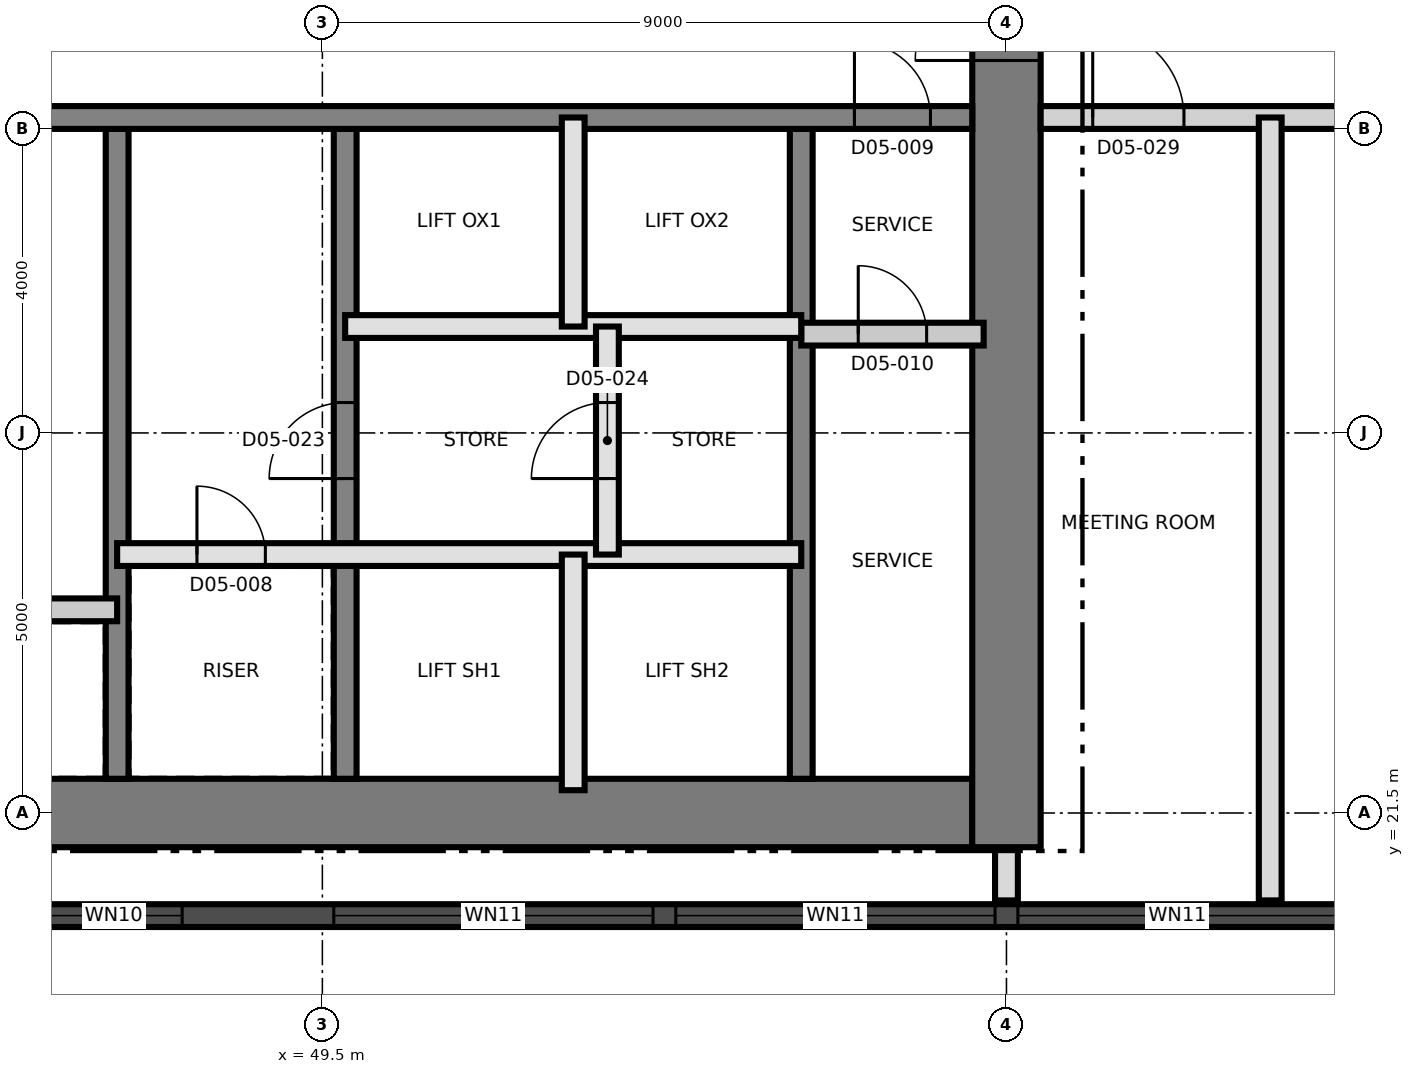
"""IFC4 building model, lengths in metres.
Left out: names, types, materials, properties, quantities, classifications, styles, units other than length and angle.
Written with IfcOpenShell. Run it as: python <this file> out.ifc"""

import sys

from ifc_helpers import new_model, si_unit, direction, frame, frame_2d, origin, place, context, subcontext, project, spatial, rectangle, extrude, element, fill, save


model = new_model("IFC4")
c1 = context("Model", 3, precision=1e-05, world=origin(), true_north=direction((0.0, 1.0)))
c2 = subcontext(c1, "Body", "Model", "MODEL_VIEW")
j1 = project(units=[si_unit("LENGTHUNIT", "METRE"), si_unit("PLANEANGLEUNIT", "RADIAN")], contexts=[c1])
p1 = place(None, origin())
s1 = spatial("IfcSite", under=j1, at=p1, CompositionType="ELEMENT")
p2 = place(p1, origin())
s2 = spatial("IfcBuilding", under=s1, at=p2, CompositionType="ELEMENT")
p3 = place(p2, frame((0.0, 0.0, 77.9)))
s3 = spatial("IfcBuildingStorey", under=s2, at=p3, CompositionType="ELEMENT", Elevation=77.9)
p4 = place(p3, frame((31.05, 21.5, 0.0), z_axis=(0.0, 0.0, 1.0), x_axis=(1.0, 0.0, 0.0)))
e1 = element("IfcWall", 1, at=p4, inside=s3, PredefinedType="SHEAR", context=c2, shape_type="SweptSolid", body=[
    extrude(rectangle(XDim=27.0, YDim=0.9, at=frame_2d((13.5, 0.0))), origin(), (0.0, 0.0, 1.0), 3.7),
])
p5 = place(p3, frame((58.5, 21.05, 0.0), z_axis=(0.0, 0.0, 1.0), x_axis=(0.0, 1.0, 0.0)))
e2 = element("IfcWall", 2, at=p5, inside=s3, PredefinedType="SHEAR", context=c2, shape_type="SweptSolid", body=[
    extrude(rectangle(XDim=18.9, YDim=0.9, at=frame_2d((9.45, 0.0))), origin(), (0.0, 0.0, 1.0), 3.7),
])
p6 = place(p5, frame((10.35, 0.0, 0.0)))
e3 = element("IfcOpeningElement", 3, at=p6, cuts=e2, PredefinedType="OPENING", context=c2, shape_type="SweptSolid", body=[
    extrude(rectangle(XDim=1.2, YDim=2.1, at=frame_2d((0.6, 1.05))), frame((0.0, 0.46, 0.0), z_axis=(0.0, -1.0, 0.0), x_axis=(1.0, 0.0, 0.0)), (0.0, 0.0, 1.0), 0.92),
])
p7 = place(p3, frame((46.8, 21.95, 0.0), z_axis=(0.0, 0.0, 1.0), x_axis=(0.0, 1.0, 0.0)))
e4 = element("IfcWall", 4, at=p7, inside=s3, PredefinedType="SHEAR", context=c2, shape_type="SweptSolid", body=[
    extrude(rectangle(XDim=8.55, YDim=0.3, at=frame_2d((4.275, 0.0))), origin(), (0.0, 0.0, 1.0), 3.7),
])
p8 = place(p3, frame((49.8, 21.95, 0.0), z_axis=(0.0, 0.0, 1.0), x_axis=(0.0, 1.0, 0.0)))
e5 = element("IfcWall", 5, at=p8, inside=s3, PredefinedType="SHEAR", context=c2, shape_type="SweptSolid", body=[
    extrude(rectangle(XDim=8.55, YDim=0.3, at=frame_2d((4.275, 0.0))), origin(), (0.0, 0.0, 1.0), 3.7),
])
p9 = place(p8, frame((3.95, 0.0, 0.0)))
e6 = element("IfcOpeningElement", 6, at=p9, cuts=e5, PredefinedType="OPENING", context=c2, shape_type="SweptSolid", body=[
    extrude(rectangle(XDim=1.0, YDim=2.1, at=frame_2d((0.5, 1.05))), frame((0.0, 0.16, 0.0), z_axis=(0.0, -1.0, 0.0), x_axis=(1.0, 0.0, 0.0)), (0.0, 0.0, 1.0), 0.32),
])
p10 = place(p3, frame((55.8, 21.95, 0.0), z_axis=(0.0, 0.0, 1.0), x_axis=(0.0, 1.0, 0.0)))
e7 = element("IfcWall", 7, at=p10, inside=s3, PredefinedType="SHEAR", context=c2, shape_type="SweptSolid", body=[
    extrude(rectangle(XDim=8.55, YDim=0.3, at=frame_2d((4.275, 0.0))), origin(), (0.0, 0.0, 1.0), 3.7),
])
p11 = place(p3, frame((31.95, 30.65, 0.0), z_axis=(0.0, 0.0, 1.0), x_axis=(1.0, 0.0, 0.0)))
e8 = element("IfcWall", 8, at=p11, inside=s3, PredefinedType="SHEAR", context=c2, shape_type="SweptSolid", body=[
    extrude(rectangle(XDim=26.1, YDim=0.3, at=frame_2d((13.05, 0.0))), origin(), (0.0, 0.0, 1.0), 3.7),
])
p12 = place(p11, frame((24.55, 0.0, 0.0)))
e9 = element("IfcOpeningElement", 9, at=p12, cuts=e8, PredefinedType="OPENING", context=c2, shape_type="SweptSolid", body=[
    extrude(rectangle(XDim=1.0, YDim=2.1, at=frame_2d((0.5, 1.05))), frame((0.0, 0.16, 0.0), z_axis=(0.0, -1.0, 0.0), x_axis=(1.0, 0.0, 0.0)), (0.0, 0.0, 1.0), 0.32),
])
p13 = place(p11, frame((11.35, 0.0, 0.0)))
e10 = element("IfcOpeningElement", 10, at=p13, cuts=e8, PredefinedType="OPENING", context=c2, shape_type="SweptSolid", body=[
    extrude(rectangle(XDim=1.0, YDim=2.1, at=frame_2d((0.5, 1.05))), frame((0.0, 0.16, 0.0), z_axis=(0.0, -1.0, 0.0), x_axis=(1.0, 0.0, 0.0)), (0.0, 0.0, 1.0), 0.32),
])
p14 = place(p3, frame((44.011, 20.15, 0.0), z_axis=(0.0, 0.0, 1.0), x_axis=(1.0, 0.0, 0.0)))
e11 = element("IfcWall", 11, at=p14, inside=s3, PredefinedType="SOLIDWALL", context=c2, shape_type="SweptSolid", body=[
    extrude(rectangle(XDim=43.476, YDim=0.3, at=frame_2d((21.738, 0.0))), origin(), (0.0, 0.0, 1.0), 3.4),
])
p15 = place(p14, frame((1.845, 0.0, 0.3)))
e12 = element("IfcOpeningElement", 12, at=p15, cuts=e11, PredefinedType="OPENING", context=c2, shape_type="SweptSolid", body=[
    extrude(rectangle(XDim=1.8, YDim=2.4, at=frame_2d((0.9, 1.2))), frame((0.0, 0.16, 0.0), z_axis=(0.0, -1.0, 0.0), x_axis=(1.0, 0.0, 0.0)), (0.0, 0.0, 1.0), 0.32),
])
p16 = place(p14, frame((5.639, 0.0, 0.9)))
e13 = element("IfcOpeningElement", 13, at=p16, cuts=e11, PredefinedType="OPENING", context=c2, shape_type="SweptSolid", body=[
    extrude(rectangle(XDim=4.2, YDim=1.5, at=frame_2d((2.1, 0.75))), frame((0.0, 0.16, 0.0), z_axis=(0.0, -1.0, 0.0), x_axis=(1.0, 0.0, 0.0)), (0.0, 0.0, 1.0), 0.32),
])
p17 = place(p14, frame((10.139, 0.0, 0.9)))
e14 = element("IfcOpeningElement", 14, at=p17, cuts=e11, PredefinedType="OPENING", context=c2, shape_type="SweptSolid", body=[
    extrude(rectangle(XDim=4.2, YDim=1.5, at=frame_2d((2.1, 0.75))), frame((0.0, 0.16, 0.0), z_axis=(0.0, -1.0, 0.0), x_axis=(1.0, 0.0, 0.0)), (0.0, 0.0, 1.0), 0.32),
])
p18 = place(p14, frame((14.639, 0.0, 0.9)))
e15 = element("IfcOpeningElement", 15, at=p18, cuts=e11, PredefinedType="OPENING", context=c2, shape_type="SweptSolid", body=[
    extrude(rectangle(XDim=4.2, YDim=1.5, at=frame_2d((2.1, 0.75))), frame((0.0, 0.16, 0.0), z_axis=(0.0, -1.0, 0.0), x_axis=(1.0, 0.0, 0.0)), (0.0, 0.0, 1.0), 0.32),
])
p19 = place(p14, frame((19.139, 0.0, 0.9)))
e16 = element("IfcOpeningElement", 16, at=p19, cuts=e11, PredefinedType="OPENING", context=c2, shape_type="SweptSolid", body=[
    extrude(rectangle(XDim=4.2, YDim=1.5, at=frame_2d((2.1, 0.75))), frame((0.0, 0.16, 0.0), z_axis=(0.0, -1.0, 0.0), x_axis=(1.0, 0.0, 0.0)), (0.0, 0.0, 1.0), 0.32),
])
p20 = place(p14, frame((23.639, 0.0, 0.9)))
e17 = element("IfcOpeningElement", 17, at=p20, cuts=e11, PredefinedType="OPENING", context=c2, shape_type="SweptSolid", body=[
    extrude(rectangle(XDim=4.2, YDim=1.5, at=frame_2d((2.1, 0.75))), frame((0.0, 0.16, 0.0), z_axis=(0.0, -1.0, 0.0), x_axis=(1.0, 0.0, 0.0)), (0.0, 0.0, 1.0), 0.32),
])
p21 = place(p14, frame((28.139, 0.0, 0.9)))
e18 = element("IfcOpeningElement", 18, at=p21, cuts=e11, PredefinedType="OPENING", context=c2, shape_type="SweptSolid", body=[
    extrude(rectangle(XDim=4.2, YDim=1.5, at=frame_2d((2.1, 0.75))), frame((0.0, 0.16, 0.0), z_axis=(0.0, -1.0, 0.0), x_axis=(1.0, 0.0, 0.0)), (0.0, 0.0, 1.0), 0.32),
])
p22 = place(p14, frame((32.639, 0.0, 0.9)))
e19 = element("IfcOpeningElement", 19, at=p22, cuts=e11, PredefinedType="OPENING", context=c2, shape_type="SweptSolid", body=[
    extrude(rectangle(XDim=4.2, YDim=1.5, at=frame_2d((2.1, 0.75))), frame((0.0, 0.16, 0.0), z_axis=(0.0, -1.0, 0.0), x_axis=(1.0, 0.0, 0.0)), (0.0, 0.0, 1.0), 0.32),
])
p23 = place(p14, frame((37.139, 0.0, 0.9)))
e20 = element("IfcOpeningElement", 20, at=p23, cuts=e11, PredefinedType="OPENING", context=c2, shape_type="SweptSolid", body=[
    extrude(rectangle(XDim=4.2, YDim=1.5, at=frame_2d((2.1, 0.75))), frame((0.0, 0.16, 0.0), z_axis=(0.0, -1.0, 0.0), x_axis=(1.0, 0.0, 0.0)), (0.0, 0.0, 1.0), 0.32),
])
p24 = place(p3, frame((40.8, 24.173, 0.0), z_axis=(0.0, 0.0, 1.0), x_axis=(1.0, 0.0, 0.0)))
e21 = element("IfcWall", 21, at=p24, inside=s3, PredefinedType="PARTITIONING", context=c2, shape_type="SweptSolid", body=[
    extrude(rectangle(XDim=6.0, YDim=0.3, at=frame_2d((3.0, 0.0))), origin(), (0.0, 0.0, 1.0), 3.4),
])
p25 = place(p24, frame((2.5, 0.0, 0.0)))
e22 = element("IfcOpeningElement", 22, at=p25, cuts=e21, PredefinedType="OPENING", context=c2, shape_type="SweptSolid", body=[
    extrude(rectangle(XDim=1.0, YDim=2.1, at=frame_2d((0.5, 1.05))), frame((0.0, 0.16, 0.0), z_axis=(0.0, -1.0, 0.0), x_axis=(1.0, 0.0, 0.0)), (0.0, 0.0, 1.0), 0.32),
])
p26 = place(p3, frame((46.8, 24.9, 0.0), z_axis=(0.0, 0.0, 1.0), x_axis=(1.0, 0.0, 0.0)))
e23 = element("IfcWall", 23, at=p26, inside=s3, PredefinedType="SOLIDWALL", context=c2, shape_type="SweptSolid", body=[
    extrude(rectangle(XDim=9.0, YDim=0.3, at=frame_2d((4.5, 0.0))), origin(), (0.0, 0.0, 1.0), 3.4),
])
p27 = place(p26, frame((1.05, 0.0, 0.0)))
e24 = element("IfcOpeningElement", 24, at=p27, cuts=e23, PredefinedType="OPENING", context=c2, shape_type="SweptSolid", body=[
    extrude(rectangle(XDim=0.9, YDim=2.1, at=frame_2d((0.45, 1.05))), frame((0.0, 0.16, 0.0), z_axis=(0.0, -1.0, 0.0), x_axis=(1.0, 0.0, 0.0)), (0.0, 0.0, 1.0), 0.32),
])
p28 = place(p3, frame((55.8, 27.8, 0.0), z_axis=(0.0, 0.0, 1.0), x_axis=(1.0, 0.0, 0.0)))
e25 = element("IfcWall", 25, at=p28, inside=s3, PredefinedType="PARTITIONING", context=c2, shape_type="SweptSolid", body=[
    extrude(rectangle(XDim=2.4, YDim=0.3, at=frame_2d((1.2, 0.0))), origin(), (0.0, 0.0, 1.0), 3.4),
])
p29 = place(p28, frame((0.75, 0.0, 0.0)))
e26 = element("IfcOpeningElement", 26, at=p29, cuts=e25, PredefinedType="OPENING", context=c2, shape_type="SweptSolid", body=[
    extrude(rectangle(XDim=0.9, YDim=2.1, at=frame_2d((0.45, 1.05))), frame((0.0, 0.16, 0.0), z_axis=(0.0, -1.0, 0.0), x_axis=(1.0, 0.0, 0.0)), (0.0, 0.0, 1.0), 0.32),
])
p30 = place(p3, frame((49.8, 27.9, 0.0), z_axis=(0.0, 0.0, 1.0), x_axis=(1.0, 0.0, 0.0)))
e27 = element("IfcWall", 27, at=p30, inside=s3, PredefinedType="SOLIDWALL", context=c2, shape_type="SweptSolid", body=[
    extrude(rectangle(XDim=6.0, YDim=0.3, at=frame_2d((3.0, 0.0))), origin(), (0.0, 0.0, 1.0), 3.4),
])
p31 = place(p3, frame((52.8, 21.8, 0.0), z_axis=(0.0, 0.0, 1.0), x_axis=(0.0, 1.0, 0.0)))
e28 = element("IfcWall", 28, at=p31, inside=s3, PredefinedType="SOLIDWALL", context=c2, shape_type="SweptSolid", body=[
    extrude(rectangle(XDim=3.1, YDim=0.3, at=frame_2d((1.55, 0.0))), origin(), (0.0, 0.0, 1.0), 3.4),
])
p32 = place(p3, frame((52.8, 27.9, 0.0), z_axis=(0.0, 0.0, 1.0), x_axis=(0.0, 1.0, 0.0)))
e29 = element("IfcWall", 29, at=p32, inside=s3, PredefinedType="SOLIDWALL", context=c2, shape_type="SweptSolid", body=[
    extrude(rectangle(XDim=2.75, YDim=0.3, at=frame_2d((1.375, 0.0))), origin(), (0.0, 0.0, 1.0), 3.4),
])
p33 = place(p3, frame((53.25, 24.9, 0.0), z_axis=(0.0, 0.0, 1.0), x_axis=(0.0, 1.0, 0.0)))
e30 = element("IfcWall", 30, at=p33, inside=s3, PredefinedType="SOLIDWALL", context=c2, shape_type="SweptSolid", body=[
    extrude(rectangle(XDim=3.0, YDim=0.3, at=frame_2d((1.5, 0.0))), origin(), (0.0, 0.0, 1.0), 3.4),
])
p34 = place(p33, frame((1.0, 0.0, 0.0)))
e31 = element("IfcOpeningElement", 31, at=p34, cuts=e30, PredefinedType="OPENING", context=c2, shape_type="SweptSolid", body=[
    extrude(rectangle(XDim=1.0, YDim=2.1, at=frame_2d((0.5, 1.05))), frame((0.0, 0.16, 0.0), z_axis=(0.0, -1.0, 0.0), x_axis=(1.0, 0.0, 0.0)), (0.0, 0.0, 1.0), 0.32),
])
p35 = place(p3, frame((58.95, 30.65, 0.0), z_axis=(0.0, 0.0, 1.0), x_axis=(1.0, 0.0, 0.0)))
e32 = element("IfcWall", 32, at=p35, inside=s3, PredefinedType="PARTITIONING", context=c2, shape_type="SweptSolid", body=[
    extrude(rectangle(XDim=26.38, YDim=0.3, at=frame_2d((13.19, 0.0))), origin(), (0.0, 0.0, 1.0), 3.4),
])
p36 = place(p35, frame((0.685, 0.0, 0.0)))
e33 = element("IfcOpeningElement", 33, at=p36, cuts=e32, PredefinedType="OPENING", context=c2, shape_type="SweptSolid", body=[
    extrude(rectangle(XDim=1.2, YDim=2.1, at=frame_2d((0.6, 1.05))), frame((0.0, 0.16, 0.0), z_axis=(0.0, -1.0, 0.0), x_axis=(1.0, 0.0, 0.0)), (0.0, 0.0, 1.0), 0.32),
])
p37 = place(p35, frame((3.935, 0.0, 0.0)))
e34 = element("IfcOpeningElement", 34, at=p37, cuts=e32, PredefinedType="OPENING", context=c2, shape_type="SweptSolid", body=[
    extrude(rectangle(XDim=1.0, YDim=2.1, at=frame_2d((0.5, 1.05))), frame((0.0, 0.16, 0.0), z_axis=(0.0, -1.0, 0.0), x_axis=(1.0, 0.0, 0.0)), (0.0, 0.0, 1.0), 0.32),
])
p38 = place(p35, frame((11.965, 0.0, 0.0)))
e35 = element("IfcOpeningElement", 35, at=p38, cuts=e32, PredefinedType="OPENING", context=c2, shape_type="SweptSolid", body=[
    extrude(rectangle(XDim=1.0, YDim=2.1, at=frame_2d((0.5, 1.05))), frame((0.0, 0.16, 0.0), z_axis=(0.0, -1.0, 0.0), x_axis=(1.0, 0.0, 0.0)), (0.0, 0.0, 1.0), 0.32),
])
p39 = place(p35, frame((14.915, 0.0, 0.0)))
e36 = element("IfcOpeningElement", 36, at=p39, cuts=e32, PredefinedType="OPENING", context=c2, shape_type="SweptSolid", body=[
    extrude(rectangle(XDim=1.4, YDim=2.1, at=frame_2d((0.7, 1.05))), frame((0.0, 0.16, 0.0), z_axis=(0.0, -1.0, 0.0), x_axis=(1.0, 0.0, 0.0)), (0.0, 0.0, 1.0), 0.32),
])
p40 = place(p35, frame((18.685, 0.0, 0.0)))
e37 = element("IfcOpeningElement", 37, at=p40, cuts=e32, PredefinedType="OPENING", context=c2, shape_type="SweptSolid", body=[
    extrude(rectangle(XDim=1.2, YDim=2.1, at=frame_2d((0.6, 1.05))), frame((0.0, 0.16, 0.0), z_axis=(0.0, -1.0, 0.0), x_axis=(1.0, 0.0, 0.0)), (0.0, 0.0, 1.0), 0.32),
])
p41 = place(p35, frame((21.935, 0.0, 0.0)))
e38 = element("IfcOpeningElement", 38, at=p41, cuts=e32, PredefinedType="OPENING", context=c2, shape_type="SweptSolid", body=[
    extrude(rectangle(XDim=1.0, YDim=2.1, at=frame_2d((0.5, 1.05))), frame((0.0, 0.16, 0.0), z_axis=(0.0, -1.0, 0.0), x_axis=(1.0, 0.0, 0.0)), (0.0, 0.0, 1.0), 0.32),
])
p42 = place(p3, frame((58.5, 20.35, 0.0), z_axis=(0.0, 0.0, 1.0), x_axis=(0.0, 1.0, 0.0)))
e39 = element("IfcWall", 39, at=p42, inside=s3, PredefinedType="PARTITIONING", context=c2, shape_type="SweptSolid", body=[
    extrude(rectangle(XDim=0.68, YDim=0.3, at=frame_2d((0.34, 0.0))), origin(), (0.0, 0.0, 1.0), 3.4),
])
p43 = place(p3, frame((61.97, 20.35, 0.0), z_axis=(0.0, 0.0, 1.0), x_axis=(0.0, 1.0, 0.0)))
e40 = element("IfcWall", 40, at=p43, inside=s3, PredefinedType="PARTITIONING", context=c2, shape_type="SweptSolid", body=[
    extrude(rectangle(XDim=10.3, YDim=0.3, at=frame_2d((5.15, 0.0))), origin(), (0.0, 0.0, 1.0), 3.4),
])
p44 = place(p15, origin())
e41 = element("IfcWindow", 41, at=p44, inside=s3, PartitioningType="SINGLE_PANEL", PredefinedType="WINDOW", context=c2, shape_type="SweptSolid", body=[
    extrude(rectangle(XDim=1.8, YDim=2.4, at=frame_2d((0.9, 1.2))), frame((0.0, 0.03, 0.0), z_axis=(0.0, -1.0, 0.0), x_axis=(1.0, 0.0, 0.0)), (0.0, 0.0, 1.0), 0.06),
])
fill(e12, e41)
p45 = place(p16, origin())
e42 = element("IfcWindow", 42, at=p45, inside=s3, PartitioningType="SINGLE_PANEL", PredefinedType="WINDOW", context=c2, shape_type="SweptSolid", body=[
    extrude(rectangle(XDim=4.2, YDim=1.5, at=frame_2d((2.1, 0.75))), frame((0.0, 0.03, 0.0), z_axis=(0.0, -1.0, 0.0), x_axis=(1.0, 0.0, 0.0)), (0.0, 0.0, 1.0), 0.06),
])
fill(e13, e42)
p46 = place(p17, origin())
e43 = element("IfcWindow", 43, at=p46, inside=s3, PartitioningType="SINGLE_PANEL", PredefinedType="WINDOW", context=c2, shape_type="SweptSolid", body=[
    extrude(rectangle(XDim=4.2, YDim=1.5, at=frame_2d((2.1, 0.75))), frame((0.0, 0.03, 0.0), z_axis=(0.0, -1.0, 0.0), x_axis=(1.0, 0.0, 0.0)), (0.0, 0.0, 1.0), 0.06),
])
fill(e14, e43)
p47 = place(p18, origin())
e44 = element("IfcWindow", 44, at=p47, inside=s3, PartitioningType="SINGLE_PANEL", PredefinedType="WINDOW", context=c2, shape_type="SweptSolid", body=[
    extrude(rectangle(XDim=4.2, YDim=1.5, at=frame_2d((2.1, 0.75))), frame((0.0, 0.03, 0.0), z_axis=(0.0, -1.0, 0.0), x_axis=(1.0, 0.0, 0.0)), (0.0, 0.0, 1.0), 0.06),
])
fill(e15, e44)
p48 = place(p27, origin())
e45 = element("IfcDoor", 45, at=p48, inside=s3, OperationType="SINGLE_SWING_RIGHT", PredefinedType="DOOR", context=c2, shape_type="SweptSolid", body=[
    extrude(rectangle(XDim=0.9, YDim=2.1, at=frame_2d((0.45, 1.05))), frame((0.0, 0.025, 0.0), z_axis=(0.0, -1.0, 0.0), x_axis=(1.0, 0.0, 0.0)), (0.0, 0.0, 1.0), 0.05),
])
fill(e24, e45)
p49 = place(p12, origin())
e46 = element("IfcDoor", 46, at=p49, inside=s3, OperationType="SINGLE_SWING_LEFT", PredefinedType="DOOR", context=c2, shape_type="SweptSolid", body=[
    extrude(rectangle(XDim=1.0, YDim=2.1, at=frame_2d((0.5, 1.05))), frame((0.0, 0.025, 0.0), z_axis=(0.0, -1.0, 0.0), x_axis=(1.0, 0.0, 0.0)), (0.0, 0.0, 1.0), 0.05),
])
fill(e9, e46)
p50 = place(p29, origin())
e47 = element("IfcDoor", 47, at=p50, inside=s3, OperationType="SINGLE_SWING_RIGHT", PredefinedType="DOOR", context=c2, shape_type="SweptSolid", body=[
    extrude(rectangle(XDim=0.9, YDim=2.1, at=frame_2d((0.45, 1.05))), frame((0.0, 0.025, 0.0), z_axis=(0.0, -1.0, 0.0), x_axis=(1.0, 0.0, 0.0)), (0.0, 0.0, 1.0), 0.05),
])
fill(e26, e47)
p51 = place(p6, origin())
e48 = element("IfcDoor", 48, at=p51, inside=s3, OperationType="SINGLE_SWING_LEFT", PredefinedType="DOOR", context=c2, shape_type="SweptSolid", body=[
    extrude(rectangle(XDim=1.2, YDim=2.1, at=frame_2d((0.6, 1.05))), frame((0.0, 0.025, 0.0), z_axis=(0.0, -1.0, 0.0), x_axis=(1.0, 0.0, 0.0)), (0.0, 0.0, 1.0), 0.05),
])
fill(e3, e48)
p52 = place(p9, origin())
e49 = element("IfcDoor", 49, at=p52, inside=s3, OperationType="SINGLE_SWING_LEFT", PredefinedType="DOOR", context=c2, shape_type="SweptSolid", body=[
    extrude(rectangle(XDim=1.0, YDim=2.1, at=frame_2d((0.5, 1.05))), frame((0.0, 0.025, 0.0), z_axis=(0.0, -1.0, 0.0), x_axis=(1.0, 0.0, 0.0)), (0.0, 0.0, 1.0), 0.05),
])
fill(e6, e49)
p53 = place(p34, origin())
e50 = element("IfcDoor", 50, at=p53, inside=s3, OperationType="SINGLE_SWING_RIGHT", PredefinedType="DOOR", context=c2, shape_type="SweptSolid", body=[
    extrude(rectangle(XDim=1.0, YDim=2.1, at=frame_2d((0.5, 1.05))), frame((0.0, 0.025, 0.0), z_axis=(0.0, -1.0, 0.0), x_axis=(1.0, 0.0, 0.0)), (0.0, 0.0, 1.0), 0.05),
])
fill(e31, e50)
p54 = place(p36, origin())
e51 = element("IfcDoor", 51, at=p54, inside=s3, OperationType="SINGLE_SWING_LEFT", PredefinedType="DOOR", context=c2, shape_type="SweptSolid", body=[
    extrude(rectangle(XDim=1.2, YDim=2.1, at=frame_2d((0.6, 1.05))), frame((0.0, 0.025, 0.0), z_axis=(0.0, -1.0, 0.0), x_axis=(1.0, 0.0, 0.0)), (0.0, 0.0, 1.0), 0.05),
])
fill(e33, e51)
save(model, sys.argv[1])
